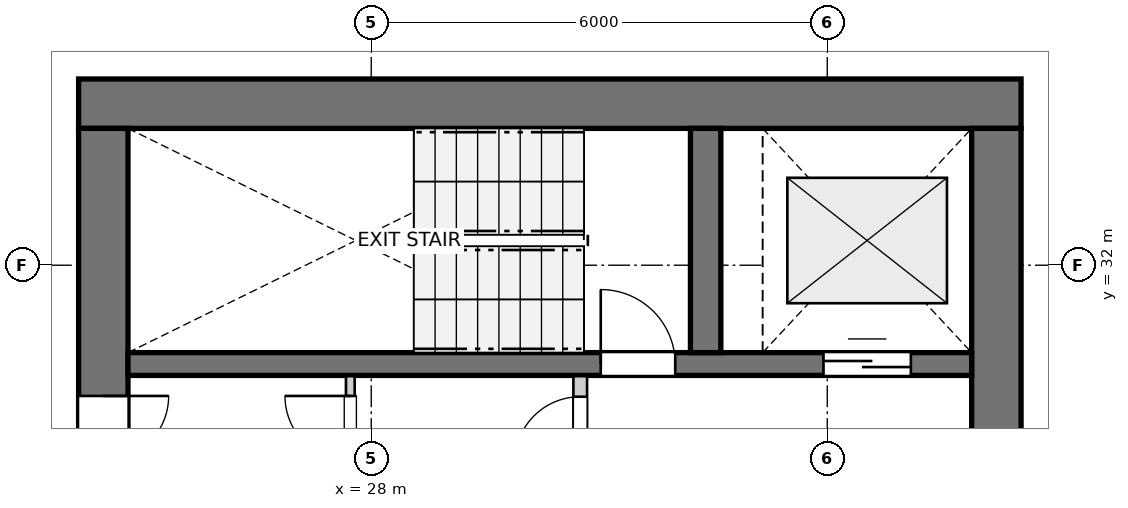
"""IFC4 building model, lengths in metres.
Left out: names, types, materials, properties, quantities, classifications, styles, units other than length and angle.
Written with IfcOpenShell. Run it as: python <this file> out.ifc"""

import sys

from ifc_helpers import new_model, si_unit, direction, frame, frame_2d, origin, place, context, subcontext, project, spatial, rectangle, extrude, source, transform, mapped, element, fill, save


model = new_model("IFC4")
c1 = context("Model", 3, precision=1e-05, world=origin(), true_north=direction((0.0, 1.0)))
c2 = subcontext(c1, "Body", "Model", "MODEL_VIEW")
j1 = project(units=[si_unit("LENGTHUNIT", "METRE"), si_unit("PLANEANGLEUNIT", "RADIAN")], contexts=[c1])
p1 = place(None, origin())
s1 = spatial("IfcSite", under=j1, at=p1, CompositionType="ELEMENT")
p2 = place(p1, origin())
s2 = spatial("IfcBuilding", under=s1, at=p2, CompositionType="ELEMENT")
p3 = place(p2, frame((0.0, 0.0, 115.2)))
s3 = spatial("IfcBuildingStorey", under=s2, at=p3, CompositionType="ELEMENT", Elevation=115.2)
p4 = place(p3, frame((36.55, 34.125, 0.0), z_axis=(0.0, 0.0, 1.0), x_axis=(-1.0, 0.0, 0.0)))
e1 = element("IfcWall", 1, at=p4, inside=s3, PredefinedType="SHEAR", context=c2, shape_type="SweptSolid", body=[
    extrude(rectangle(XDim=12.4, YDim=0.65, at=frame_2d((6.2, 0.0))), origin(), (0.0, 0.0, 1.0), 2.95),
])
p5 = place(p3, frame((24.475, 33.8, 0.0), z_axis=(0.0, 0.0, 1.0), x_axis=(0.0, -1.0, 0.0)))
e2 = element("IfcWall", 2, at=p5, inside=s3, PredefinedType="SHEAR", context=c2, shape_type="SweptSolid", body=[
    extrude(rectangle(XDim=15.6, YDim=0.65, at=frame_2d((7.8, 0.0))), origin(), (0.0, 0.0, 1.0), 2.95),
])
p6 = place(p5, frame((7.05, 0.0, 0.0)))
e3 = element("IfcOpeningElement", 3, at=p6, cuts=e2, PredefinedType="OPENING", context=c2, shape_type="SweptSolid", body=[
    extrude(rectangle(XDim=1.5, YDim=2.15, at=frame_2d((0.75, 1.075))), frame((0.0, 0.335, 0.0), z_axis=(0.0, -1.0, 0.0), x_axis=(1.0, 0.0, 0.0)), (0.0, 0.0, 1.0), 0.67),
])
p7 = place(p5, frame((3.52, 0.0, 0.0)))
e4 = element("IfcOpeningElement", 4, at=p7, cuts=e2, PredefinedType="OPENING", context=c2, shape_type="SweptSolid", body=[
    extrude(rectangle(XDim=0.86, YDim=2.05, at=frame_2d((0.43, 1.025))), frame((0.0, 0.335, 0.0), z_axis=(0.0, -1.0, 0.0), x_axis=(1.0, 0.0, 0.0)), (0.0, 0.0, 1.0), 0.67),
])
p8 = place(p5, frame((11.22, 0.0, 0.0)))
e5 = element("IfcOpeningElement", 5, at=p8, cuts=e2, PredefinedType="OPENING", context=c2, shape_type="SweptSolid", body=[
    extrude(rectangle(XDim=0.86, YDim=2.05, at=frame_2d((0.43, 1.025))), frame((0.0, 0.335, 0.0), z_axis=(0.0, -1.0, 0.0), x_axis=(1.0, 0.0, 0.0)), (0.0, 0.0, 1.0), 0.67),
])
p9 = place(p3, frame((36.225, 18.2, 0.0), z_axis=(0.0, 0.0, 1.0), x_axis=(0.0, 1.0, 0.0)))
e6 = element("IfcWall", 6, at=p9, inside=s3, PredefinedType="SHEAR", context=c2, shape_type="SweptSolid", body=[
    extrude(rectangle(XDim=15.6, YDim=0.65, at=frame_2d((7.8, 0.0))), origin(), (0.0, 0.0, 1.0), 2.95),
])
p10 = place(p9, frame((4.25, 0.0, 0.0)))
e7 = element("IfcOpeningElement", 7, at=p10, cuts=e6, PredefinedType="OPENING", context=c2, shape_type="SweptSolid", body=[
    extrude(rectangle(XDim=1.1, YDim=2.15, at=frame_2d((0.55, 1.075))), frame((0.0, 0.335, 0.0), z_axis=(0.0, -1.0, 0.0), x_axis=(1.0, 0.0, 0.0)), (0.0, 0.0, 1.0), 0.67),
])
p11 = place(p9, frame((10.25, 0.0, 0.0)))
e8 = element("IfcOpeningElement", 8, at=p11, cuts=e6, PredefinedType="OPENING", context=c2, shape_type="SweptSolid", body=[
    extrude(rectangle(XDim=1.1, YDim=2.15, at=frame_2d((0.55, 1.075))), frame((0.0, 0.335, 0.0), z_axis=(0.0, -1.0, 0.0), x_axis=(1.0, 0.0, 0.0)), (0.0, 0.0, 1.0), 0.67),
])
p12 = place(p3, frame((24.8, 30.7, 0.0), z_axis=(0.0, 0.0, 1.0), x_axis=(1.0, 0.0, 0.0)))
e9 = element("IfcWall", 9, at=p12, inside=s3, PredefinedType="SHEAR", context=c2, shape_type="SweptSolid", body=[
    extrude(rectangle(XDim=11.1, YDim=0.3, at=frame_2d((5.55, 0.0))), origin(), (0.0, 0.0, 1.0), 2.95),
])
p13 = place(p12, frame((6.22, 0.0, 0.0)))
e10 = element("IfcOpeningElement", 10, at=p13, cuts=e9, PredefinedType="OPENING", context=c2, shape_type="SweptSolid", body=[
    extrude(rectangle(XDim=0.98, YDim=2.15, at=frame_2d((0.49, 1.075))), frame((0.0, 0.16, 0.0), z_axis=(0.0, -1.0, 0.0), x_axis=(1.0, 0.0, 0.0)), (0.0, 0.0, 1.0), 0.32),
])
p14 = place(p12, frame((9.15, 0.0, 0.0)))
e11 = element("IfcOpeningElement", 11, at=p14, cuts=e9, PredefinedType="OPENING", context=c2, shape_type="SweptSolid", body=[
    extrude(rectangle(XDim=1.15, YDim=2.15, at=frame_2d((0.575, 1.075))), frame((0.0, 0.16, 0.0), z_axis=(0.0, -1.0, 0.0), x_axis=(1.0, 0.0, 0.0)), (0.0, 0.0, 1.0), 0.32),
])
p15 = place(p3, frame((32.4, 30.85, 0.0), z_axis=(0.0, 0.0, 1.0), x_axis=(0.0, 1.0, 0.0)))
e12 = element("IfcWall", 12, at=p15, inside=s3, PredefinedType="SHEAR", context=c2, shape_type="SweptSolid", body=[
    extrude(rectangle(XDim=2.95, YDim=0.4, at=frame_2d((1.475, 0.0))), origin(), (0.0, 0.0, 1.0), 2.95),
])
p16 = place(p3, frame((30.75, 27.43, 0.0), z_axis=(0.0, 0.0, 1.0), x_axis=(0.0, 1.0, 0.0)))
e13 = element("IfcWall", 13, at=p16, inside=s3, PredefinedType="PARTITIONING", context=c2, shape_type="SweptSolid", body=[
    extrude(rectangle(XDim=3.11, YDim=0.18, at=frame_2d((1.555, 0.0))), origin(), (0.0, 0.0, 1.0), 2.95),
])
p17 = place(p16, frame((1.98, 0.0, 0.0)))
e14 = element("IfcOpeningElement", 14, at=p17, cuts=e13, PredefinedType="OPENING", context=c2, shape_type="SweptSolid", body=[
    extrude(rectangle(XDim=0.86, YDim=2.05, at=frame_2d((0.43, 1.025))), frame((0.0, 0.1, 0.0), z_axis=(0.0, -1.0, 0.0), x_axis=(1.0, 0.0, 0.0)), (0.0, 0.0, 1.0), 0.2),
])
p18 = place(p3, frame((27.725, 29.16, 0.0), z_axis=(0.0, 0.0, 1.0), x_axis=(0.0, 1.0, 0.0)))
e15 = element("IfcWall", 15, at=p18, inside=s3, PredefinedType="PARTITIONING", context=c2, shape_type="SweptSolid", body=[
    extrude(rectangle(XDim=1.38, YDim=0.115, at=frame_2d((0.69, 0.0))), origin(), (0.0, 0.0, 1.0), 2.95),
])
p19 = place(p18, frame((0.26, 0.0, 0.0)))
e16 = element("IfcOpeningElement", 16, at=p19, cuts=e15, PredefinedType="OPENING", context=c2, shape_type="SweptSolid", body=[
    extrude(rectangle(XDim=0.86, YDim=2.05, at=frame_2d((0.43, 1.025))), frame((0.0, 0.067, 0.0), z_axis=(0.0, -1.0, 0.0), x_axis=(1.0, 0.0, 0.0)), (0.0, 0.0, 1.0), 0.135),
])
m1 = source(origin(), c2, "Body", "SweptSolid", [
    extrude(rectangle(XDim=0.98, YDim=2.15, at=frame_2d((0.49, 1.075))), frame((0.0, 0.025, 0.0), z_axis=(0.0, -1.0, 0.0), x_axis=(1.0, 0.0, 0.0)), (0.0, 0.0, 1.0), 0.05),
])
p20 = place(p13, origin())
e17 = element("IfcDoor", 17, at=p20, inside=s3, OperationType="SINGLE_SWING_LEFT", PredefinedType="DOOR", context=c2, shape_type="MappedRepresentation", body=[
    mapped(m1, transform((0.0, 0.0, 0.0), x_axis=(1.0, 0.0, 0.0), y_axis=(0.0, 1.0, 0.0), z_axis=(0.0, 0.0, 1.0), scale=1.0)),
])
fill(e10, e17)
m2 = source(origin(), c2, "Body", "SweptSolid", [
    extrude(rectangle(XDim=1.15, YDim=2.15, at=frame_2d((0.575, 1.075))), frame((0.0, 0.025, 0.0), z_axis=(0.0, -1.0, 0.0), x_axis=(1.0, 0.0, 0.0)), (0.0, 0.0, 1.0), 0.05),
])
p21 = place(p14, origin())
e18 = element("IfcDoor", 18, at=p21, inside=s3, OperationType="DOUBLE_DOOR_SLIDING", PredefinedType="DOOR", context=c2, shape_type="MappedRepresentation", body=[
    mapped(m2, transform((0.0, 0.0, 0.0), x_axis=(1.0, 0.0, 0.0), y_axis=(0.0, 1.0, 0.0), z_axis=(0.0, 0.0, 1.0), scale=1.0)),
])
fill(e11, e18)
m3 = source(origin(), c2, "Body", "SweptSolid", [
    extrude(rectangle(XDim=0.86, YDim=2.05, at=frame_2d((0.43, 1.025))), frame((0.0, 0.025, 0.0), z_axis=(0.0, -1.0, 0.0), x_axis=(1.0, 0.0, 0.0)), (0.0, 0.0, 1.0), 0.05),
])
p22 = place(p7, origin())
e19 = element("IfcDoor", 19, at=p22, inside=s3, OperationType="SINGLE_SWING_LEFT", PredefinedType="DOOR", context=c2, shape_type="MappedRepresentation", body=[
    mapped(m3, transform((0.0, 0.0, 0.0), x_axis=(1.0, 0.0, 0.0), y_axis=(0.0, 1.0, 0.0), z_axis=(0.0, 0.0, 1.0), scale=1.0)),
])
fill(e4, e19)
p23 = place(p17, origin())
e20 = element("IfcDoor", 20, at=p23, inside=s3, OperationType="SINGLE_SWING_LEFT", PredefinedType="DOOR", context=c2, shape_type="MappedRepresentation", body=[
    mapped(m3, transform((0.0, 0.0, 0.0), x_axis=(1.0, 0.0, 0.0), y_axis=(0.0, 1.0, 0.0), z_axis=(0.0, 0.0, 1.0), scale=1.0)),
])
fill(e14, e20)
p24 = place(p19, origin())
e21 = element("IfcDoor", 21, at=p24, inside=s3, OperationType="SINGLE_SWING_RIGHT", PredefinedType="DOOR", context=c2, shape_type="MappedRepresentation", body=[
    mapped(m3, transform((0.0, 0.0, 0.0), x_axis=(1.0, 0.0, 0.0), y_axis=(0.0, 1.0, 0.0), z_axis=(0.0, 0.0, 1.0), scale=1.0)),
])
fill(e16, e21)
save(model, sys.argv[1])
